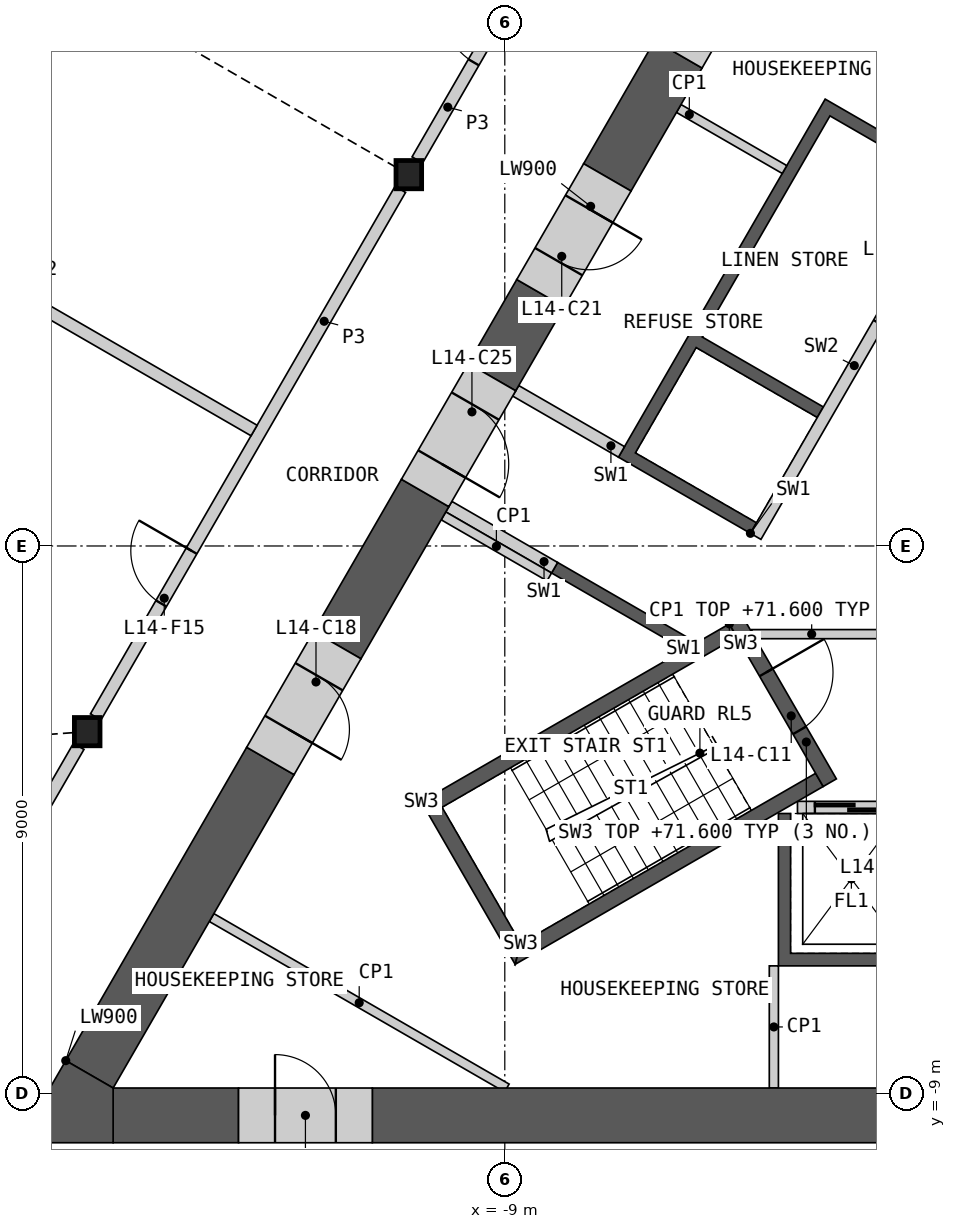
"""IFC4 building model, lengths in metres.
Left out: names, types, materials, properties, quantities, classifications, styles, units other than length and angle.
Written with IfcOpenShell. Run it as: python <this file> out.ifc"""

import sys

from ifc_helpers import new_model, si_unit, direction, frame, frame_2d, origin, origin_2d, place, context, subcontext, project, spatial, polyline, rectangle, i_section, outline, extrude, element, fill, save


model = new_model("IFC4")
c1 = context("Model", 3, precision=1e-05, world=origin(), true_north=direction((0.0, 1.0)))
c2 = subcontext(c1, "Body", "Model", "MODEL_VIEW")
j1 = project(units=[si_unit("LENGTHUNIT", "METRE"), si_unit("PLANEANGLEUNIT", "RADIAN")], contexts=[c1])
p1 = place(None, origin())
s1 = spatial("IfcSite", under=j1, at=p1, CompositionType="ELEMENT")
p2 = place(p1, origin())
s2 = spatial("IfcBuilding", under=s1, at=p2, CompositionType="ELEMENT")
p3 = place(p2, frame((0.0, 0.0, 67.8)))
s3 = spatial("IfcBuildingStorey", under=s2, at=p3, CompositionType="ELEMENT", Elevation=67.8)
for number, where, z_axis, x_axis in (
    (1, (-10.578, 6.107, 0.0), (0.0, 0.0, 1.0), (1.0, 0.0, 0.0)),
    (2, (-15.868, -3.054, 0.0), (0.0, 0.0, 1.0), (1.0, 0.0, 0.0)),
):
    element("IfcColumn", number, at=place(p3, frame(where, z_axis=z_axis, x_axis=x_axis)), inside=s3, PredefinedType="COLUMN", context=c2, shape_type="SweptSolid", body=[
        extrude(i_section(OverallWidth=0.421, OverallDepth=0.465, WebThickness=0.045, FlangeThickness=0.072, at=origin_2d()), origin(), (0.0, 0.0, 1.0), 4.2),
    ])
p4 = place(p3, origin())
e3 = element("IfcWall", 3, at=p4, inside=s3, PredefinedType="SHEAR", context=c2, shape_type="SweptSolid", body=[
    extrude(outline(polyline([(4.5, -4.4), (4.5, -6.906), (-4.5, -6.906), (-4.5, -4.4), (-4.3, -4.4), (-4.3, -6.7), (-2.3, -6.7), (-2.3, -4.4), (-2.1, -4.4), (-2.1, -6.7), (-0.1, -6.7), (-0.1, -4.4), (0.1, -4.4), (0.1, -6.7), (2.1, -6.7), (2.1, -4.4), (2.3, -4.4), (2.3, -6.7), (4.3, -6.7), (4.3, -4.4), (4.5, -4.4)])), origin(), (0.0, 0.0, 1.0), 3.8),
])
p5 = place(p3, frame((-4.187, -4.3, 0.0), z_axis=(0.0, 0.0, 1.0), x_axis=(1.0, 0.0, 0.0)))
e4 = element("IfcWall", 4, at=p5, inside=s3, PredefinedType="SOLIDWALL", context=c2, shape_type="SweptSolid", body=[
    extrude(rectangle(XDim=8.373, YDim=0.2, at=frame_2d((4.187, 0.0))), origin(), (0.0, 0.0, 1.0), 3.8),
])
p6 = place(p5, frame((0.287, 0.0, 0.0)))
e5 = element("IfcOpeningElement", 5, at=p6, cuts=e4, PredefinedType="OPENING", context=c2, shape_type="SweptSolid", body=[
    extrude(rectangle(XDim=1.2, YDim=2.1, at=frame_2d((0.6, 1.05))), frame((0.0, 0.11, 0.0), z_axis=(0.0, -1.0, 0.0), x_axis=(1.0, 0.0, 0.0)), (0.0, 0.0, 1.0), 0.22),
])
p7 = place(p5, frame((2.387, 0.0, 0.0)))
e6 = element("IfcOpeningElement", 6, at=p7, cuts=e4, PredefinedType="OPENING", context=c2, shape_type="SweptSolid", body=[
    extrude(rectangle(XDim=1.4, YDim=2.1, at=frame_2d((0.7, 1.05))), frame((0.0, 0.11, 0.0), z_axis=(0.0, -1.0, 0.0), x_axis=(1.0, 0.0, 0.0)), (0.0, 0.0, 1.0), 0.22),
])
p8 = place(p5, frame((4.737, 0.0, 0.0)))
e7 = element("IfcOpeningElement", 7, at=p8, cuts=e4, PredefinedType="OPENING", context=c2, shape_type="SweptSolid", body=[
    extrude(rectangle(XDim=1.1, YDim=2.1, at=frame_2d((0.55, 1.05))), frame((0.0, 0.11, 0.0), z_axis=(0.0, -1.0, 0.0), x_axis=(1.0, 0.0, 0.0)), (0.0, 0.0, 1.0), 0.22),
])
p9 = place(p5, frame((6.887, 0.0, 0.0)))
e8 = element("IfcOpeningElement", 8, at=p9, cuts=e4, PredefinedType="OPENING", context=c2, shape_type="SweptSolid", body=[
    extrude(rectangle(XDim=1.2, YDim=2.1, at=frame_2d((0.6, 1.05))), frame((0.0, 0.11, 0.0), z_axis=(0.0, -1.0, 0.0), x_axis=(1.0, 0.0, 0.0)), (0.0, 0.0, 1.0), 0.22),
])
p10 = place(p3, origin())
e9 = element("IfcWall", 9, at=p10, inside=s3, PredefinedType="SHEAR", context=c2, shape_type="SweptSolid", body=[
    extrude(outline(polyline([(-6.061, -1.697), (-8.231, -0.444), (-8.131, -0.271), (-5.96, -1.524), (-6.061, -1.697)])), origin(), (0.0, 0.0, 1.0), 3.8),
])
p11 = place(p3, origin())
e10 = element("IfcWall", 10, at=p11, inside=s3, PredefinedType="SHEAR", context=c2, shape_type="SweptSolid", body=[
    extrude(outline(polyline([(-4.96, 0.208), (-7.131, 1.461), (-3.731, 7.35), (-1.561, 6.097), (-1.66, 5.924), (-3.652, 7.074), (-5.752, 3.437), (-3.76, 2.287), (-3.861, 2.113), (-5.852, 3.263), (-6.852, 1.531), (-4.861, 0.381), (-4.96, 0.208)])), origin(), (0.0, 0.0, 1.0), 3.8),
])
p12 = place(p3, frame((-1.631, 5.776, 0.0), z_axis=(0.0, 0.0, 1.0), x_axis=(-0.499992876559, -0.866029516466, 0.0)))
e11 = element("IfcWall", 11, at=p12, inside=s3, PredefinedType="SOLIDWALL", context=c2, shape_type="SweptSolid", body=[
    extrude(rectangle(XDim=6.486, YDim=0.2, at=frame_2d((3.243, 0.0))), origin(), (0.0, 0.0, 1.0), 3.8),
])
p13 = place(p12, frame((1.537, 0.0, 0.0)))
e12 = element("IfcOpeningElement", 12, at=p13, cuts=e11, PredefinedType="OPENING", context=c2, shape_type="SweptSolid", body=[
    extrude(rectangle(XDim=0.9, YDim=2.1, at=frame_2d((0.45, 1.05))), frame((0.0, 0.11, 0.0), z_axis=(0.0, -1.0, 0.0), x_axis=(1.0, 0.0, 0.0)), (0.0, 0.0, 1.0), 0.22),
])
p14 = place(p3, frame((-7.081, 1.548, 0.0), z_axis=(0.0, 0.0, 1.0), x_axis=(-0.865983199114, 0.50007309351, 0.0)))
e13 = element("IfcWall", 13, at=p14, inside=s3, PredefinedType="SHEAR", context=c2, shape_type="SweptSolid", body=[
    extrude(rectangle(XDim=2.009, YDim=0.2, at=frame_2d((1.004, 0.0))), origin(), (0.0, 0.0, 1.0), 3.8),
])
p15 = place(p3, frame((-8.181, -0.357, 0.0), z_axis=(0.0, 0.0, 1.0), x_axis=(-0.866035824272, 0.499981950752, 0.0)))
e14 = element("IfcWall", 14, at=p15, inside=s3, PredefinedType="SHEAR", context=c2, shape_type="SweptSolid", body=[
    extrude(rectangle(XDim=2.009, YDim=0.2, at=frame_2d((1.004, 0.0))), origin(), (0.0, 0.0, 1.0), 3.8),
])
p16 = place(p3, frame((-4.941, -1.45, 0.0), z_axis=(0.0, 0.0, 1.0), x_axis=(1.0, 0.0, 0.0)))
e15 = element("IfcWall", 15, at=p16, inside=s3, PredefinedType="PARTITIONING", context=c2, shape_type="SweptSolid", body=[
    extrude(rectangle(XDim=9.882, YDim=0.15, at=frame_2d((4.941, 0.0))), origin(), (0.0, 0.0, 1.0), 3.8),
])
p17 = place(p16, frame((4.391, 0.0, 0.0)))
e16 = element("IfcOpeningElement", 16, at=p17, cuts=e15, PredefinedType="OPENING", context=c2, shape_type="SweptSolid", body=[
    extrude(rectangle(XDim=1.1, YDim=2.1, at=frame_2d((0.55, 1.05))), frame((0.0, 0.085, 0.0), z_axis=(0.0, -1.0, 0.0), x_axis=(1.0, 0.0, 0.0)), (0.0, 0.0, 1.0), 0.17),
])
p18 = place(p3, origin())
e17 = element("IfcWall", 17, at=p18, inside=s3, PredefinedType="SHEAR", context=c2, shape_type="SweptSolid", body=[
    extrude(outline(polyline([(-5.307, -1.281), (-10.374, -4.206), (-10.032, -4.298), (-5.182, -1.498), (-5.307, -1.281)])), origin(), (0.0, 0.0, 1.0), 3.8),
])
p19 = place(p3, origin())
e18 = element("IfcWall", 18, at=p19, inside=s3, PredefinedType="SHEAR", context=c2, shape_type="SweptSolid", body=[
    extrude(outline(polyline([(-10.374, -4.206), (-8.83, -6.881), (-8.738, -6.539), (-10.032, -4.298), (-10.374, -4.206)])), origin(), (0.0, 0.0, 1.0), 3.8),
])
p20 = place(p3, origin())
e19 = element("IfcWall", 19, at=p20, inside=s3, PredefinedType="SHEAR", context=c2, shape_type="SweptSolid", body=[
    extrude(outline(polyline([(-8.738, -6.539), (-8.83, -6.881), (-3.763, -3.956), (-3.888, -3.739), (-8.738, -6.539)])), origin(), (0.0, 0.0, 1.0), 3.8),
])
p21 = place(p3, frame((-5.199, -1.219, 0.0), z_axis=(0.0, 0.0, 1.0), x_axis=(0.499982516597, -0.866035497597, 0.0)))
e20 = element("IfcWall", 20, at=p21, inside=s3, PredefinedType="SHEAR", context=c2, shape_type="SweptSolid", body=[
    extrude(rectangle(XDim=3.088, YDim=0.25, at=frame_2d((1.544, 0.0))), origin(), (0.0, 0.0, 1.0), 3.8),
])
p22 = place(p21, frame((0.994, 0.0, 0.0)))
e21 = element("IfcOpeningElement", 21, at=p22, cuts=e20, PredefinedType="OPENING", context=c2, shape_type="SweptSolid", body=[
    extrude(rectangle(XDim=1.1, YDim=2.1, at=frame_2d((0.55, 1.05))), frame((0.0, 0.135, 0.0), z_axis=(0.0, -1.0, 0.0), x_axis=(1.0, 0.0, 0.0)), (0.0, 0.0, 1.0), 0.27),
])
p23 = place(p3, frame((-4.575, -6.906, 0.0), z_axis=(0.0, 0.0, 1.0), x_axis=(0.0, -1.0, 0.0)))
e22 = element("IfcWall", 22, at=p23, inside=s3, PredefinedType="PARTITIONING", context=c2, shape_type="SweptSolid", body=[
    extrude(rectangle(XDim=2.009, YDim=0.15, at=frame_2d((1.004, 0.0))), origin(), (0.0, 0.0, 1.0), 3.8),
])
for number, where, z_axis, x_axis in (
    (23, (-8.268, -0.509, 0.0), (0.0, 0.0, 1.0), (-0.866, 0.5, 0.0)),
    (24, (-6.139, 7.196, 0.0), (0.0, 0.0, 1.0), (0.866, -0.5, 0.0)),
):
    element("IfcWall", number, at=place(p3, frame(where, z_axis=z_axis, x_axis=x_axis)), inside=s3, PredefinedType="PARTITIONING", context=c2, shape_type="SweptSolid", body=[
        extrude(rectangle(XDim=2.009, YDim=0.15, at=frame_2d((1.004, 0.0))), origin(), (0.0, 0.0, 1.0), 3.8),
    ])
p24 = place(p3, frame((-13.823, -6.111, 0.0), z_axis=(0.0, 0.0, 1.0), x_axis=(0.866026802741, -0.499997576928, 0.0)))
e25 = element("IfcWall", 25, at=p24, inside=s3, PredefinedType="PARTITIONING", context=c2, shape_type="SweptSolid", body=[
    extrude(rectangle(XDim=5.607, YDim=0.15, at=frame_2d((2.804, 0.0))), origin(), (0.0, 0.0, 1.0), 3.8),
])
p25 = place(p3, frame((-11.179, -9.365, 0.0), z_axis=(0.0, 0.0, 1.0), x_axis=(1.0, 0.0, 0.0)))
e26 = element("IfcWall", 26, at=p25, inside=s3, PredefinedType="SHEAR", context=c2, shape_type="SweptSolid", body=[
    extrude(rectangle(XDim=10.079, YDim=0.9, at=frame_2d((5.04, 0.0))), origin(), (0.0, 0.0, 1.0), 3.8),
])
p26 = place(p3, frame((-15.441, -9.365, 0.0), z_axis=(0.0, 0.0, 1.0), x_axis=(1.0, 0.0, 0.0)))
e27 = element("IfcWall", 27, at=p26, inside=s3, PredefinedType="SHEAR", context=c2, shape_type="SweptSolid", body=[
    extrude(rectangle(XDim=2.062, YDim=0.9, at=frame_2d((1.031, 0.0))), origin(), (0.0, 0.0, 1.0), 3.8),
])
p27 = place(p3, frame((-12.855, -3.536, 0.0), z_axis=(0.0, 0.0, 1.0), x_axis=(-0.499999419053, -0.866025739194, 0.0)))
e28 = element("IfcWall", 28, at=p27, inside=s3, PredefinedType="SHEAR", context=c2, shape_type="SweptSolid", body=[
    extrude(rectangle(XDim=5.952, YDim=0.9, at=frame_2d((2.976, 0.0))), origin(), (0.0, 0.0, 1.0), 3.8),
])
p28 = place(p3, frame((-10.31, 0.872, 0.0), z_axis=(0.0, 0.0, 1.0), x_axis=(-0.499946751862, -0.866056144429, 0.0)))
e29 = element("IfcWall", 29, at=p28, inside=s3, PredefinedType="SHEAR", context=c2, shape_type="SweptSolid", body=[
    extrude(rectangle(XDim=2.889, YDim=0.9, at=frame_2d((1.445, 0.0))), origin(), (0.0, 0.0, 1.0), 3.8),
])
p29 = place(p3, frame((-6.145, 8.086, 0.0), z_axis=(0.0, 0.0, 1.0), x_axis=(-0.500026924946, -0.866009858102, 0.0)))
e30 = element("IfcWall", 30, at=p29, inside=s3, PredefinedType="SHEAR", context=c2, shape_type="SweptSolid", body=[
    extrude(rectangle(XDim=2.337, YDim=0.9, at=frame_2d((1.168, 0.0))), origin(), (0.0, 0.0, 1.0), 3.8),
])
p30 = place(p3, frame((-8.413, 4.157, 0.0), z_axis=(0.0, 0.0, 1.0), x_axis=(-0.499961121316, -0.86604784924, 0.0)))
e31 = element("IfcWall", 31, at=p30, inside=s3, PredefinedType="SHEAR", context=c2, shape_type="SweptSolid", body=[
    extrude(rectangle(XDim=1.594, YDim=0.9, at=frame_2d((0.797, 0.0))), origin(), (0.0, 0.0, 1.0), 3.8),
])
p31 = place(p3, origin())
e32 = element("IfcWall", 32, at=p31, inside=s3, PredefinedType="SHEAR", context=c2, shape_type="SweptSolid", body=[
    extrude(outline(polyline([(-16.221, -8.465), (-15.441, -8.915), (-15.441, -9.815), (-17.0, -9.815), (-16.221, -8.465)])), origin(), (0.0, 0.0, 1.0), 3.8),
])
p32 = place(p3, frame((-13.379, -9.365, 0.0), z_axis=(0.0, 0.0, 1.0), x_axis=(1.0, 0.0, 0.0)))
e33 = element("IfcWall", 33, at=p32, inside=s3, PredefinedType="SHEAR", context=c2, shape_type="SweptSolid", body=[
    extrude(rectangle(XDim=2.2, YDim=0.9, at=frame_2d((1.1, 0.0))), origin(), (0.0, 0.0, 1.0), 3.8),
])
p33 = place(p32, frame((0.6, 0.0, 0.0)))
e34 = element("IfcOpeningElement", 34, at=p33, cuts=e33, PredefinedType="OPENING", context=c2, shape_type="SweptSolid", body=[
    extrude(rectangle(XDim=1.0, YDim=2.1, at=frame_2d((0.5, 1.05))), frame((0.0, 0.46, 0.0), z_axis=(0.0, -1.0, 0.0), x_axis=(1.0, 0.0, 0.0)), (0.0, 0.0, 1.0), 0.92),
])
p34 = place(p3, frame((-11.755, -1.63, 0.0), z_axis=(0.0, 0.0, 1.0), x_axis=(-0.50002983664, -0.866008176907, 0.0)))
e35 = element("IfcWall", 35, at=p34, inside=s3, PredefinedType="SHEAR", context=c2, shape_type="SweptSolid", body=[
    extrude(rectangle(XDim=2.2, YDim=0.9, at=frame_2d((1.1, 0.0))), origin(), (0.0, 0.0, 1.0), 3.8),
])
p35 = place(p34, frame((0.6, 0.0, 0.0)))
e36 = element("IfcOpeningElement", 36, at=p35, cuts=e35, PredefinedType="OPENING", context=c2, shape_type="SweptSolid", body=[
    extrude(rectangle(XDim=1.0, YDim=2.1, at=frame_2d((0.5, 1.05))), frame((0.0, 0.46, 0.0), z_axis=(0.0, -1.0, 0.0), x_axis=(1.0, 0.0, 0.0)), (0.0, 0.0, 1.0), 0.92),
])
p36 = place(p3, frame((-7.313, 6.062, 0.0), z_axis=(0.0, 0.0, 1.0), x_axis=(-0.500077893725, -0.86598042715, 0.0)))
e37 = element("IfcWall", 37, at=p36, inside=s3, PredefinedType="SHEAR", context=c2, shape_type="SweptSolid", body=[
    extrude(rectangle(XDim=2.2, YDim=0.9, at=frame_2d((1.1, 0.0))), origin(), (0.0, 0.0, 1.0), 3.8),
])
p37 = place(p36, frame((0.6, 0.0, 0.0)))
e38 = element("IfcOpeningElement", 38, at=p37, cuts=e37, PredefinedType="OPENING", context=c2, shape_type="SweptSolid", body=[
    extrude(rectangle(XDim=1.0, YDim=2.1, at=frame_2d((0.5, 1.05))), frame((0.0, 0.46, 0.0), z_axis=(0.0, -1.0, 0.0), x_axis=(1.0, 0.0, 0.0)), (0.0, 0.0, 1.0), 0.92),
])
p38 = place(p3, frame((-5.045, 9.992, 0.0), z_axis=(0.0, 0.0, 1.0), x_axis=(-0.499898558967, -0.866083962871, 0.0)))
e39 = element("IfcWall", 39, at=p38, inside=s3, PredefinedType="SHEAR", context=c2, shape_type="SweptSolid", body=[
    extrude(rectangle(XDim=2.2, YDim=0.9, at=frame_2d((1.1, 0.0))), origin(), (0.0, 0.0, 1.0), 3.8),
])
p39 = place(p38, frame((0.6, 0.0, 0.0)))
e40 = element("IfcOpeningElement", 40, at=p39, cuts=e39, PredefinedType="OPENING", context=c2, shape_type="SweptSolid", body=[
    extrude(rectangle(XDim=1.0, YDim=2.1, at=frame_2d((0.5, 1.05))), frame((0.0, 0.46, 0.0), z_axis=(0.0, -1.0, 0.0), x_axis=(1.0, 0.0, 0.0)), (0.0, 0.0, 1.0), 0.92),
])
p40 = place(p3, frame((-9.21, 2.777, 0.0), z_axis=(0.0, 0.0, 1.0), x_axis=(-0.500077893725, -0.86598042715, 0.0)))
e41 = element("IfcWall", 41, at=p40, inside=s3, PredefinedType="SHEAR", context=c2, shape_type="SweptSolid", body=[
    extrude(rectangle(XDim=2.2, YDim=0.9, at=frame_2d((1.1, 0.0))), origin(), (0.0, 0.0, 1.0), 3.8),
])
p41 = place(p40, frame((0.55, 0.0, 0.0)))
e42 = element("IfcOpeningElement", 42, at=p41, cuts=e41, PredefinedType="OPENING", context=c2, shape_type="SweptSolid", body=[
    extrude(rectangle(XDim=1.1, YDim=2.1, at=frame_2d((0.55, 1.05))), frame((0.0, 0.46, 0.0), z_axis=(0.0, -1.0, 0.0), x_axis=(1.0, 0.0, 0.0)), (0.0, 0.0, 1.0), 0.92),
])
p42 = place(p3, frame((-15.728, -2.811, 0.0), z_axis=(0.0, 0.0, 1.0), x_axis=(0.49999175339, 0.866030164915, 0.0)))
e43 = element("IfcWall", 43, at=p42, inside=s3, PredefinedType="PARTITIONING", context=c2, shape_type="SweptSolid", body=[
    extrude(rectangle(XDim=10.019, YDim=0.2, at=frame_2d((5.009, 0.0))), origin(), (0.0, 0.0, 1.0), 3.8),
])
p43 = place(p42, frame((2.154, 0.0, 0.0)))
e44 = element("IfcOpeningElement", 44, at=p43, cuts=e43, PredefinedType="OPENING", context=c2, shape_type="SweptSolid", body=[
    extrude(rectangle(XDim=1.0, YDim=2.1, at=frame_2d((0.5, 1.05))), frame((0.0, 0.11, 0.0), z_axis=(0.0, -1.0, 0.0), x_axis=(1.0, 0.0, 0.0)), (0.0, 0.0, 1.0), 0.22),
])
p44 = place(p3, frame((-10.439, 6.35, 0.0), z_axis=(0.0, 0.0, 1.0), x_axis=(0.50001002959, 0.86601961312, 0.0)))
e45 = element("IfcWall", 45, at=p44, inside=s3, PredefinedType="PARTITIONING", context=c2, shape_type="SweptSolid", body=[
    extrude(rectangle(XDim=10.019, YDim=0.2, at=frame_2d((5.009, 0.0))), origin(), (0.0, 0.0, 1.0), 3.8),
])
p45 = place(p44, frame((6.865, 0.0, 0.0)))
e46 = element("IfcOpeningElement", 46, at=p45, cuts=e45, PredefinedType="OPENING", context=c2, shape_type="SweptSolid", body=[
    extrude(rectangle(XDim=1.0, YDim=2.1, at=frame_2d((0.5, 1.05))), frame((0.0, 0.11, 0.0), z_axis=(0.0, -1.0, 0.0), x_axis=(1.0, 0.0, 0.0)), (0.0, 0.0, 1.0), 0.22),
])
p46 = place(p44, frame((1.854, 0.0, 0.0)))
e47 = element("IfcOpeningElement", 47, at=p46, cuts=e45, PredefinedType="OPENING", context=c2, shape_type="SweptSolid", body=[
    extrude(rectangle(XDim=1.0, YDim=2.1, at=frame_2d((0.5, 1.05))), frame((0.0, 0.11, 0.0), z_axis=(0.0, -1.0, 0.0), x_axis=(1.0, 0.0, 0.0)), (0.0, 0.0, 1.0), 0.22),
])
p47 = place(p3, frame((-19.244, -8.902, 0.0), z_axis=(0.0, 0.0, 1.0), x_axis=(0.499984737558, 0.86603421538, 0.0)))
e48 = element("IfcWall", 48, at=p47, inside=s3, PredefinedType="PARTITIONING", context=c2, shape_type="SweptSolid", body=[
    extrude(rectangle(XDim=6.473, YDim=0.2, at=frame_2d((3.236, 0.0))), origin(), (0.0, 0.0, 1.0), 3.8),
])
p48 = place(p47, frame((0.859, 0.0, 0.0)))
e49 = element("IfcOpeningElement", 49, at=p48, cuts=e48, PredefinedType="OPENING", context=c2, shape_type="SweptSolid", body=[
    extrude(rectangle(XDim=1.0, YDim=2.1, at=frame_2d((0.5, 1.05))), frame((0.0, 0.11, 0.0), z_axis=(0.0, -1.0, 0.0), x_axis=(1.0, 0.0, 0.0)), (0.0, 0.0, 1.0), 0.22),
])
p49 = place(p3, frame((-20.558, 6.191, 0.0), z_axis=(0.0, 0.0, 1.0), x_axis=(0.866024086673, -0.500002281298, 0.0)))
e50 = element("IfcWall", 50, at=p49, inside=s3, PredefinedType="PARTITIONING", context=c2, shape_type="SweptSolid", body=[
    extrude(rectangle(XDim=8.584, YDim=0.2, at=frame_2d((4.292, 0.0))), origin(), (0.0, 0.0, 1.0), 2.885),
])
p50 = place(p6, origin())
e51 = element("IfcDoor", 51, at=p50, inside=s3, OperationType="SLIDING_TO_LEFT", PredefinedType="DOOR", context=c2, shape_type="SweptSolid", body=[
    extrude(rectangle(XDim=1.2, YDim=2.1, at=frame_2d((0.6, 1.05))), frame((0.0, 0.025, 0.0), z_axis=(0.0, -1.0, 0.0), x_axis=(1.0, 0.0, 0.0)), (0.0, 0.0, 1.0), 0.05),
])
fill(e5, e51)
p51 = place(p22, origin())
e52 = element("IfcDoor", 52, at=p51, inside=s3, OperationType="SINGLE_SWING_LEFT", PredefinedType="DOOR", context=c2, shape_type="SweptSolid", body=[
    extrude(rectangle(XDim=1.1, YDim=2.1, at=frame_2d((0.55, 1.05))), frame((0.0, 0.025, 0.0), z_axis=(0.0, -1.0, 0.0), x_axis=(1.0, 0.0, 0.0)), (0.0, 0.0, 1.0), 0.05),
])
fill(e21, e52)
p52 = place(p33, origin())
e53 = element("IfcDoor", 53, at=p52, inside=s3, OperationType="SINGLE_SWING_LEFT", PredefinedType="DOOR", context=c2, shape_type="SweptSolid", body=[
    extrude(rectangle(XDim=1.0, YDim=2.1, at=frame_2d((0.5, 1.05))), frame((0.0, 0.205, 0.0), z_axis=(0.0, -1.0, 0.0), x_axis=(1.0, 0.0, 0.0)), (0.0, 0.0, 1.0), 0.05),
])
fill(e34, e53)
p53 = place(p35, origin())
e54 = element("IfcDoor", 54, at=p53, inside=s3, OperationType="SINGLE_SWING_RIGHT", PredefinedType="DOOR", context=c2, shape_type="SweptSolid", body=[
    extrude(rectangle(XDim=1.0, YDim=2.1, at=frame_2d((0.5, 1.05))), frame((0.0, 0.205, 0.0), z_axis=(0.0, -1.0, 0.0), x_axis=(1.0, 0.0, 0.0)), (0.0, 0.0, 1.0), 0.05),
])
fill(e36, e54)
p54 = place(p37, origin())
e55 = element("IfcDoor", 55, at=p54, inside=s3, OperationType="SINGLE_SWING_LEFT", PredefinedType="DOOR", context=c2, shape_type="SweptSolid", body=[
    extrude(rectangle(XDim=1.0, YDim=2.1, at=frame_2d((0.5, 1.05))), frame((0.0, 0.205, 0.0), z_axis=(0.0, -1.0, 0.0), x_axis=(1.0, 0.0, 0.0)), (0.0, 0.0, 1.0), 0.05),
])
fill(e38, e55)
p55 = place(p41, origin())
e56 = element("IfcDoor", 56, at=p55, inside=s3, OperationType="SINGLE_SWING_RIGHT", PredefinedType="DOOR", context=c2, shape_type="SweptSolid", body=[
    extrude(rectangle(XDim=1.1, YDim=2.1, at=frame_2d((0.55, 1.05))), frame((0.0, 0.205, 0.0), z_axis=(0.0, -1.0, 0.0), x_axis=(1.0, 0.0, 0.0)), (0.0, 0.0, 1.0), 0.05),
])
fill(e42, e56)
p56 = place(p46, origin())
e57 = element("IfcDoor", 57, at=p56, inside=s3, OperationType="SINGLE_SWING_RIGHT", PredefinedType="DOOR", context=c2, shape_type="SweptSolid", body=[
    extrude(rectangle(XDim=1.0, YDim=2.1, at=frame_2d((0.5, 1.05))), frame((0.0, 0.025, 0.0), z_axis=(0.0, -1.0, 0.0), x_axis=(1.0, 0.0, 0.0)), (0.0, 0.0, 1.0), 0.05),
])
fill(e47, e57)
p57 = place(p43, origin())
e58 = element("IfcDoor", 58, at=p57, inside=s3, OperationType="SINGLE_SWING_RIGHT", PredefinedType="DOOR", context=c2, shape_type="SweptSolid", body=[
    extrude(rectangle(XDim=1.0, YDim=2.1, at=frame_2d((0.5, 1.05))), frame((0.0, 0.025, 0.0), z_axis=(0.0, -1.0, 0.0), x_axis=(1.0, 0.0, 0.0)), (0.0, 0.0, 1.0), 0.05),
])
fill(e44, e58)
save(model, sys.argv[1])
